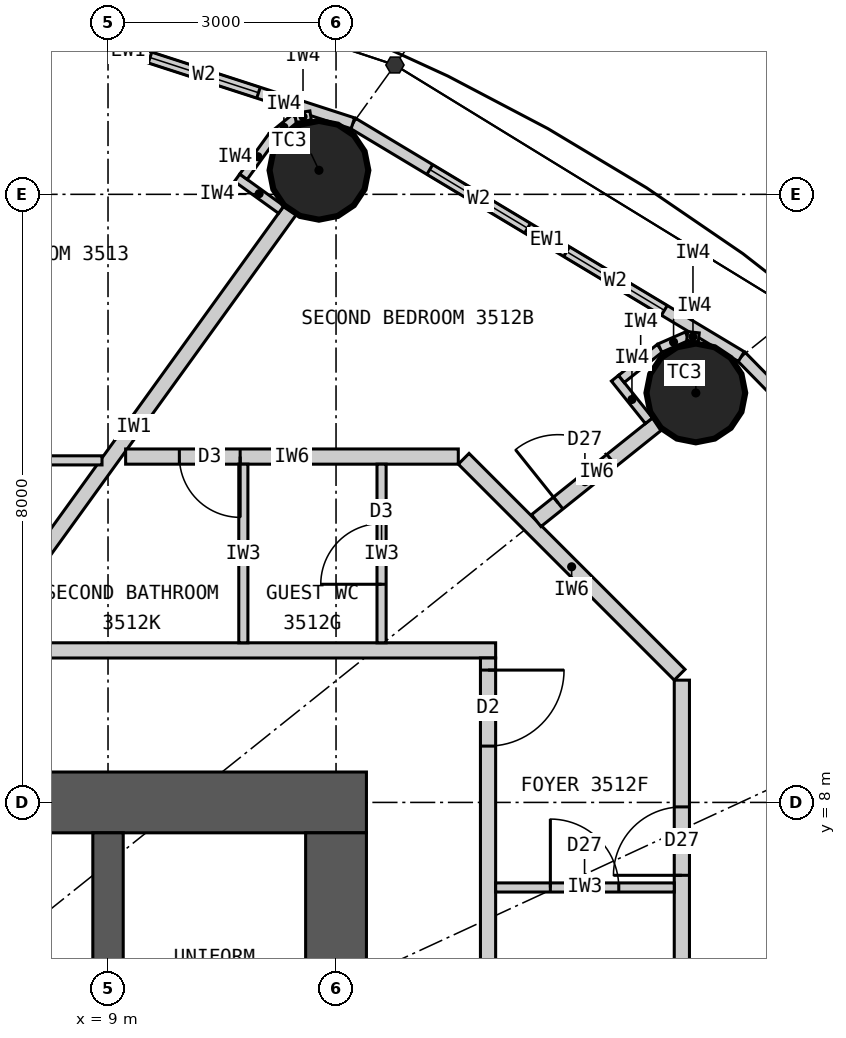
"""IFC4 building model, lengths in metres.
Left out: names, types, materials, properties, quantities, classifications, styles, units other than length and angle.
Written with IfcOpenShell. Run it as: python <this file> out.ifc"""

import sys

from ifc_helpers import new_model, si_unit, direction, frame, frame_2d, origin, origin_2d, place, context, subcontext, project, spatial, rectangle, circle, extrude, clip, halfspace, element, fill, save


model = new_model("IFC4")
c1 = context("Model", 3, precision=1e-05, world=origin(), true_north=direction((0.0, 1.0)))
c2 = subcontext(c1, "Body", "Model", "MODEL_VIEW")
j1 = project(units=[si_unit("LENGTHUNIT", "METRE"), si_unit("PLANEANGLEUNIT", "RADIAN")], contexts=[c1])
p1 = place(None, origin())
s1 = spatial("IfcSite", under=j1, at=p1, CompositionType="ELEMENT")
p2 = place(p1, origin())
s2 = spatial("IfcBuilding", under=s1, at=p2, CompositionType="ELEMENT")
p3 = place(p2, frame((0.0, 0.0, 135.3)))
s3 = spatial("IfcBuildingStorey", under=s2, at=p3, CompositionType="ELEMENT", Elevation=135.3)
for number, where, z_axis, x_axis in (
    (1, (16.734, 13.387, 0.0), (0.0, 0.0, 1.0), (1.0, 0.0, 0.0)),
    (2, (11.775, 16.316, 0.0), (0.0, 0.0, 1.0), (1.0, 0.0, 0.0)),
):
    element("IfcColumn", number, at=place(p3, frame(where, z_axis=z_axis, x_axis=x_axis)), inside=s3, PredefinedType="COLUMN", context=c2, shape_type="Clipping", body=[
        clip(extrude(circle(Radius=0.65, at=origin_2d()), origin(), (0.0, 0.0, 1.0), 3.3), halfspace(frame((0.0, 0.0, 2.25), z_axis=(0.0, 0.0, 1.0), x_axis=(1.0, 0.0, 0.0)), False)),
    ])
p4 = place(p3, frame((-12.4, 8.0, 0.0), z_axis=(0.0, 0.0, 1.0), x_axis=(1.0, 0.0, 0.0)))
e3 = element("IfcWall", 3, at=p4, inside=s3, PredefinedType="SHEAR", context=c2, shape_type="SweptSolid", body=[
    extrude(rectangle(XDim=24.8, YDim=0.8, at=frame_2d((12.4, 0.0))), origin(), (0.0, 0.0, 1.0), 3.3),
])
p5 = place(p4, frame((11.1, 0.0, 0.0)))
e4 = element("IfcOpeningElement", 4, at=p5, cuts=e3, PredefinedType="OPENING", context=c2, shape_type="SweptSolid", body=[
    extrude(rectangle(XDim=1.2, YDim=2.2, at=frame_2d((0.6, 1.1))), frame((0.0, 0.41, 0.0), z_axis=(0.0, -1.0, 0.0), x_axis=(1.0, 0.0, 0.0)), (0.0, 0.0, 1.0), 0.82),
])
p6 = place(p4, frame((18.7, 0.0, 0.0)))
e5 = element("IfcOpeningElement", 5, at=p6, cuts=e3, PredefinedType="OPENING", context=c2, shape_type="SweptSolid", body=[
    extrude(rectangle(XDim=0.9, YDim=2.2, at=frame_2d((0.45, 1.1))), frame((0.0, 0.41, 0.0), z_axis=(0.0, -1.0, 0.0), x_axis=(1.0, 0.0, 0.0)), (0.0, 0.0, 1.0), 0.82),
])
p7 = place(p3, frame((12.0, -7.6, 0.0), z_axis=(0.0, 0.0, 1.0), x_axis=(0.0, 1.0, 0.0)))
e6 = element("IfcWall", 6, at=p7, inside=s3, PredefinedType="SHEAR", context=c2, shape_type="SweptSolid", body=[
    extrude(rectangle(XDim=15.2, YDim=0.8, at=frame_2d((7.6, 0.0))), origin(), (0.0, 0.0, 1.0), 3.3),
])
p8 = place(p7, frame((6.7, 0.0, 0.0)))
e7 = element("IfcOpeningElement", 7, at=p8, cuts=e6, PredefinedType="OPENING", context=c2, shape_type="SweptSolid", body=[
    extrude(rectangle(XDim=1.8, YDim=2.2, at=frame_2d((0.9, 1.1))), frame((0.0, 0.41, 0.0), z_axis=(0.0, -1.0, 0.0), x_axis=(1.0, 0.0, 0.0)), (0.0, 0.0, 1.0), 0.82),
])
p9 = place(p3, frame((9.0, 4.5, 0.0), z_axis=(0.0, 0.0, 1.0), x_axis=(0.0, 1.0, 0.0)))
e8 = element("IfcWall", 8, at=p9, inside=s3, PredefinedType="SHEAR", context=c2, shape_type="SweptSolid", body=[
    extrude(rectangle(XDim=3.1, YDim=0.4, at=frame_2d((1.55, 0.0))), origin(), (0.0, 0.0, 1.0), 3.3),
])
p10 = place(p3, frame((21.287, 9.832, 0.0), z_axis=(0.0, 0.0, 1.0), x_axis=(-0.700136650834, 0.714008872605, 0.0)))
e9 = element("IfcWall", 9, at=p10, inside=s3, PredefinedType="ELEMENTEDWALL", context=c2, shape_type="SweptSolid", body=[
    extrude(rectangle(XDim=5.649, YDim=0.15, at=frame_2d((2.825, 0.0))), origin(), (0.0, 0.0, 1.0), 3.05),
])
p11 = place(p10, frame((1.025, 0.0, 0.9)))
e10 = element("IfcOpeningElement", 10, at=p11, cuts=e9, PredefinedType="OPENING", context=c2, shape_type="SweptSolid", body=[
    extrude(rectangle(XDim=1.5, YDim=1.9, at=frame_2d((0.75, 0.95))), frame((0.0, 0.085, 0.0), z_axis=(0.0, -1.0, 0.0), x_axis=(1.0, 0.0, 0.0)), (0.0, 0.0, 1.0), 0.17),
])
p12 = place(p10, frame((3.125, 0.0, 0.9)))
e11 = element("IfcOpeningElement", 11, at=p12, cuts=e9, PredefinedType="OPENING", context=c2, shape_type="SweptSolid", body=[
    extrude(rectangle(XDim=1.5, YDim=1.9, at=frame_2d((0.75, 0.95))), frame((0.0, 0.085, 0.0), z_axis=(0.0, -1.0, 0.0), x_axis=(1.0, 0.0, 0.0)), (0.0, 0.0, 1.0), 0.17),
])
p13 = place(p3, frame((17.332, 13.866, 0.0), z_axis=(0.0, 0.0, 1.0), x_axis=(-0.857308573723, 0.514802884044, 0.0)))
e12 = element("IfcWall", 12, at=p13, inside=s3, PredefinedType="ELEMENTEDWALL", context=c2, shape_type="SweptSolid", body=[
    extrude(rectangle(XDim=5.961, YDim=0.15, at=frame_2d((2.98, 0.0))), origin(), (0.0, 0.0, 1.0), 3.05),
])
p14 = place(p13, frame((1.181, 0.0, 0.9)))
e13 = element("IfcOpeningElement", 13, at=p14, cuts=e12, PredefinedType="OPENING", context=c2, shape_type="SweptSolid", body=[
    extrude(rectangle(XDim=1.5, YDim=1.9, at=frame_2d((0.75, 0.95))), frame((0.0, 0.085, 0.0), z_axis=(0.0, -1.0, 0.0), x_axis=(1.0, 0.0, 0.0)), (0.0, 0.0, 1.0), 0.17),
])
p15 = place(p13, frame((3.281, 0.0, 0.9)))
e14 = element("IfcOpeningElement", 14, at=p15, cuts=e12, PredefinedType="OPENING", context=c2, shape_type="SweptSolid", body=[
    extrude(rectangle(XDim=1.5, YDim=1.9, at=frame_2d((0.75, 0.95))), frame((0.0, 0.085, 0.0), z_axis=(0.0, -1.0, 0.0), x_axis=(1.0, 0.0, 0.0)), (0.0, 0.0, 1.0), 0.17),
])
p16 = place(p3, frame((12.221, 16.935, 0.0), z_axis=(0.0, 0.0, 1.0), x_axis=(-0.951272691506, 0.308350881944, 0.0)))
e15 = element("IfcWall", 15, at=p16, inside=s3, PredefinedType="ELEMENTEDWALL", context=c2, shape_type="SweptSolid", body=[
    extrude(rectangle(XDim=6.211, YDim=0.15, at=frame_2d((3.105, 0.0))), origin(), (0.0, 0.0, 1.0), 3.05),
])
p17 = place(p16, frame((1.305, 0.0, 0.9)))
e16 = element("IfcOpeningElement", 16, at=p17, cuts=e15, PredefinedType="OPENING", context=c2, shape_type="SweptSolid", body=[
    extrude(rectangle(XDim=1.5, YDim=1.9, at=frame_2d((0.75, 0.95))), frame((0.0, 0.085, 0.0), z_axis=(0.0, -1.0, 0.0), x_axis=(1.0, 0.0, 0.0)), (0.0, 0.0, 1.0), 0.17),
])
p18 = place(p16, frame((3.405, 0.0, 0.9)))
e17 = element("IfcOpeningElement", 17, at=p18, cuts=e15, PredefinedType="OPENING", context=c2, shape_type="SweptSolid", body=[
    extrude(rectangle(XDim=1.5, YDim=1.9, at=frame_2d((0.75, 0.95))), frame((0.0, 0.085, 0.0), z_axis=(0.0, -1.0, 0.0), x_axis=(1.0, 0.0, 0.0)), (0.0, 0.0, 1.0), 0.17),
])
p19 = place(p3, frame((-14.1, 10.0, 0.0), z_axis=(0.0, 0.0, 1.0), x_axis=(1.0, 0.0, 0.0)))
e18 = element("IfcWall", 18, at=p19, inside=s3, PredefinedType="PARTITIONING", context=c2, shape_type="SweptSolid", body=[
    extrude(rectangle(XDim=28.2, YDim=0.2, at=frame_2d((14.1, 0.0))), origin(), (0.0, 0.0, 1.0), 3.05),
])
p20 = place(p19, frame((12.884, 0.0, 0.0)))
e19 = element("IfcOpeningElement", 19, at=p20, cuts=e18, PredefinedType="OPENING", context=c2, shape_type="SweptSolid", body=[
    extrude(rectangle(XDim=1.0, YDim=2.2, at=frame_2d((0.5, 1.1))), frame((0.0, 0.11, 0.0), z_axis=(0.0, -1.0, 0.0), x_axis=(1.0, 0.0, 0.0)), (0.0, 0.0, 1.0), 0.22),
])
p21 = place(p19, frame((8.164, 0.0, 0.0)))
e20 = element("IfcOpeningElement", 20, at=p21, cuts=e18, PredefinedType="OPENING", context=c2, shape_type="SweptSolid", body=[
    extrude(rectangle(XDim=1.0, YDim=2.1, at=frame_2d((0.5, 1.05))), frame((0.0, 0.11, 0.0), z_axis=(0.0, -1.0, 0.0), x_axis=(1.0, 0.0, 0.0)), (0.0, 0.0, 1.0), 0.22),
])
p22 = place(p19, frame((3.591, 0.0, 0.0)))
e21 = element("IfcOpeningElement", 21, at=p22, cuts=e18, PredefinedType="OPENING", context=c2, shape_type="SweptSolid", body=[
    extrude(rectangle(XDim=1.0, YDim=2.2, at=frame_2d((0.5, 1.1))), frame((0.0, 0.11, 0.0), z_axis=(0.0, -1.0, 0.0), x_axis=(1.0, 0.0, 0.0)), (0.0, 0.0, 1.0), 0.22),
])
p23 = place(p19, frame((17.12, 0.0, 0.0)))
e22 = element("IfcOpeningElement", 22, at=p23, cuts=e18, PredefinedType="OPENING", context=c2, shape_type="SweptSolid", body=[
    extrude(rectangle(XDim=1.0, YDim=2.1, at=frame_2d((0.5, 1.05))), frame((0.0, 0.11, 0.0), z_axis=(0.0, -1.0, 0.0), x_axis=(1.0, 0.0, 0.0)), (0.0, 0.0, 1.0), 0.22),
])
p24 = place(p3, frame((14.0, -9.9, 0.0), z_axis=(0.0, 0.0, 1.0), x_axis=(0.0, 1.0, 0.0)))
e23 = element("IfcWall", 23, at=p24, inside=s3, PredefinedType="PARTITIONING", context=c2, shape_type="SweptSolid", body=[
    extrude(rectangle(XDim=19.8, YDim=0.2, at=frame_2d((9.9, 0.0))), origin(), (0.0, 0.0, 1.0), 3.05),
])
p25 = place(p24, frame((4.948, 0.0, 0.0)))
e24 = element("IfcOpeningElement", 24, at=p25, cuts=e23, PredefinedType="OPENING", context=c2, shape_type="SweptSolid", body=[
    extrude(rectangle(XDim=1.0, YDim=2.2, at=frame_2d((0.5, 1.1))), frame((0.0, 0.11, 0.0), z_axis=(0.0, -1.0, 0.0), x_axis=(1.0, 0.0, 0.0)), (0.0, 0.0, 1.0), 0.22),
])
p26 = place(p24, frame((18.641, 0.0, 0.0)))
e25 = element("IfcOpeningElement", 25, at=p26, cuts=e23, PredefinedType="OPENING", context=c2, shape_type="SweptSolid", body=[
    extrude(rectangle(XDim=1.0, YDim=2.2, at=frame_2d((0.5, 1.1))), frame((0.0, 0.11, 0.0), z_axis=(0.0, -1.0, 0.0), x_axis=(1.0, 0.0, 0.0)), (0.0, 0.0, 1.0), 0.22),
])
p27 = place(p3, frame((7.289, 10.1, 0.0), z_axis=(0.0, 0.0, 1.0), x_axis=(0.585217367024, 0.81087645997, 0.0)))
e26 = element("IfcWall", 26, at=p27, inside=s3, PredefinedType="PARTITIONING", context=c2, shape_type="SweptSolid", body=[
    extrude(rectangle(XDim=7.016, YDim=0.2, at=frame_2d((3.508, 0.0))), origin(), (0.0, 0.0, 1.0), 2.15),
])
p28 = place(p3, frame((16.55, 0.101, 0.0), z_axis=(0.0, 0.0, 1.0), x_axis=(0.0, 1.0, 0.0)))
e27 = element("IfcWall", 27, at=p28, inside=s3, PredefinedType="PARTITIONING", context=c2, shape_type="SweptSolid", body=[
    extrude(rectangle(XDim=9.508, YDim=0.2, at=frame_2d((4.754, 0.0))), origin(), (0.0, 0.0, 1.0), 3.05),
])
p29 = place(p28, frame((2.499, 0.0, 0.0)))
e28 = element("IfcOpeningElement", 28, at=p29, cuts=e27, PredefinedType="OPENING", context=c2, shape_type="SweptSolid", body=[
    extrude(rectangle(XDim=0.8, YDim=2.1, at=frame_2d((0.4, 1.05))), frame((0.0, 0.11, 0.0), z_axis=(0.0, -1.0, 0.0), x_axis=(1.0, 0.0, 0.0)), (0.0, 0.0, 1.0), 0.22),
])
p30 = place(p28, frame((6.94, 0.0, 0.0)))
e29 = element("IfcOpeningElement", 29, at=p30, cuts=e27, PredefinedType="OPENING", context=c2, shape_type="SweptSolid", body=[
    extrude(rectangle(XDim=0.9, YDim=2.1, at=frame_2d((0.45, 1.05))), frame((0.0, 0.11, 0.0), z_axis=(0.0, -1.0, 0.0), x_axis=(1.0, 0.0, 0.0)), (0.0, 0.0, 1.0), 0.22),
])
p31 = place(p3, frame((16.521, 9.679, 0.0), z_axis=(0.0, 0.0, 1.0), x_axis=(-0.707106781187, 0.707106781187, 0.0)))
e30 = element("IfcWall", 30, at=p31, inside=s3, PredefinedType="PARTITIONING", context=c2, shape_type="SweptSolid", body=[
    extrude(rectangle(XDim=4.019, YDim=0.2, at=frame_2d((2.009, 0.0))), origin(), (0.0, 0.0, 1.0), 3.05),
])
p32 = place(p3, frame((13.609, 12.55, 0.0), z_axis=(0.0, 0.0, 1.0), x_axis=(-1.0, 0.0, 0.0)))
e31 = element("IfcWall", 31, at=p32, inside=s3, PredefinedType="PARTITIONING", context=c2, shape_type="SweptSolid", body=[
    extrude(rectangle(XDim=4.377, YDim=0.2, at=frame_2d((2.188, 0.0))), origin(), (0.0, 0.0, 1.0), 3.05),
])
p33 = place(p32, frame((2.87, 0.0, 0.0)))
e32 = element("IfcOpeningElement", 32, at=p33, cuts=e31, PredefinedType="OPENING", context=c2, shape_type="SweptSolid", body=[
    extrude(rectangle(XDim=0.8, YDim=2.1, at=frame_2d((0.4, 1.05))), frame((0.0, 0.11, 0.0), z_axis=(0.0, -1.0, 0.0), x_axis=(1.0, 0.0, 0.0)), (0.0, 0.0, 1.0), 0.22),
])
p34 = place(p3, frame((14.634, 11.707, 0.0), z_axis=(0.0, 0.0, 1.0), x_axis=(0.780845447951, 0.6247242483, 0.0)))
e33 = element("IfcWall", 33, at=p34, inside=s3, PredefinedType="PARTITIONING", context=c2, shape_type="SweptSolid", body=[
    extrude(rectangle(XDim=2.039, YDim=0.2, at=frame_2d((1.02, 0.0))), origin(), (0.0, 0.0, 1.0), 2.15),
])
p35 = place(p34, frame((0.37, 0.0, 0.0)))
e34 = element("IfcOpeningElement", 34, at=p35, cuts=e33, PredefinedType="OPENING", context=c2, shape_type="SweptSolid", body=[
    extrude(rectangle(XDim=0.9, YDim=2.1, at=frame_2d((0.45, 1.05))), frame((0.0, 0.11, 0.0), z_axis=(0.0, -1.0, 0.0), x_axis=(1.0, 0.0, 0.0)), (0.0, 0.0, 1.0), 0.22),
])
p36 = place(p3, frame((14.1, 6.881, 0.0), z_axis=(0.0, 0.0, 1.0), x_axis=(1.0, 0.0, 0.0)))
e35 = element("IfcWall", 35, at=p36, inside=s3, PredefinedType="PARTITIONING", context=c2, shape_type="SweptSolid", body=[
    extrude(rectangle(XDim=2.35, YDim=0.12, at=frame_2d((1.175, 0.0))), origin(), (0.0, 0.0, 1.0), 3.05),
])
p37 = place(p36, frame((0.72, 0.0, 0.0)))
e36 = element("IfcOpeningElement", 36, at=p37, cuts=e35, PredefinedType="OPENING", context=c2, shape_type="SweptSolid", body=[
    extrude(rectangle(XDim=0.9, YDim=2.1, at=frame_2d((0.45, 1.05))), frame((0.0, 0.07, 0.0), z_axis=(0.0, -1.0, 0.0), x_axis=(1.0, 0.0, 0.0)), (0.0, 0.0, 1.0), 0.14),
])
p38 = place(p3, frame((12.599, 10.1, 0.0), z_axis=(0.0, 0.0, 1.0), x_axis=(0.0, 1.0, 0.0)))
e37 = element("IfcWall", 37, at=p38, inside=s3, PredefinedType="PARTITIONING", context=c2, shape_type="SweptSolid", body=[
    extrude(rectangle(XDim=2.35, YDim=0.12, at=frame_2d((1.175, 0.0))), origin(), (0.0, 0.0, 1.0), 3.05),
])
p39 = place(p38, frame((0.77, 0.0, 0.0)))
e38 = element("IfcOpeningElement", 38, at=p39, cuts=e37, PredefinedType="OPENING", context=c2, shape_type="SweptSolid", body=[
    extrude(rectangle(XDim=0.8, YDim=2.1, at=frame_2d((0.4, 1.05))), frame((0.0, 0.07, 0.0), z_axis=(0.0, -1.0, 0.0), x_axis=(1.0, 0.0, 0.0)), (0.0, 0.0, 1.0), 0.14),
])
p40 = place(p3, frame((10.781, 10.1, 0.0), z_axis=(0.0, 0.0, 1.0), x_axis=(0.0, 1.0, 0.0)))
e39 = element("IfcWall", 39, at=p40, inside=s3, PredefinedType="PARTITIONING", context=c2, shape_type="SweptSolid", body=[
    extrude(rectangle(XDim=2.35, YDim=0.12, at=frame_2d((1.175, 0.0))), origin(), (0.0, 0.0, 1.0), 3.05),
])
p41 = place(p3, frame((8.921, 12.5, 0.0), z_axis=(0.0, 0.0, 1.0), x_axis=(-1.0, 0.0, 0.0)))
e40 = element("IfcWall", 40, at=p41, inside=s3, PredefinedType="PARTITIONING", context=c2, shape_type="SweptSolid", body=[
    extrude(rectangle(XDim=3.672, YDim=0.12, at=frame_2d((1.836, 0.0))), origin(), (0.0, 0.0, 1.0), 3.05),
])
p42 = place(p41, frame((1.436, 0.0, 0.0)))
e41 = element("IfcOpeningElement", 41, at=p42, cuts=e40, PredefinedType="OPENING", context=c2, shape_type="SweptSolid", body=[
    extrude(rectangle(XDim=0.8, YDim=2.1, at=frame_2d((0.4, 1.05))), frame((0.0, 0.07, 0.0), z_axis=(0.0, -1.0, 0.0), x_axis=(1.0, 0.0, 0.0)), (0.0, 0.0, 1.0), 0.14),
])
p43 = place(p3, frame((16.117, 13.022, 0.0), z_axis=(0.0, 0.0, 1.0), x_axis=(-0.62465344249, 0.780902091677, 0.0)))
e42 = element("IfcWall", 42, at=p43, inside=s3, PredefinedType="PARTITIONING", context=c2, shape_type="SweptSolid", body=[
    extrude(rectangle(XDim=0.716, YDim=0.12, at=frame_2d((0.358, 0.0))), origin(), (0.0, 0.0, 1.0), 3.05),
])
p44 = place(p3, frame((15.754, 13.571, 0.0), z_axis=(0.0, 0.0, 1.0), x_axis=(0.780905453553, 0.624649239663, 0.0)))
e43 = element("IfcWall", 43, at=p44, inside=s3, PredefinedType="PARTITIONING", context=c2, shape_type="SweptSolid", body=[
    extrude(rectangle(XDim=0.65, YDim=0.12, at=frame_2d((0.325, 0.0))), origin(), (0.0, 0.0, 1.0), 3.05),
])
p45 = place(p3, frame((16.262, 13.977, 0.0), z_axis=(0.0, 0.0, 1.0), x_axis=(0.915985403703, 0.401211590314, 0.0)))
e44 = element("IfcWall", 44, at=p45, inside=s3, PredefinedType="PARTITIONING", context=c2, shape_type="SweptSolid", body=[
    extrude(rectangle(XDim=0.391, YDim=0.12, at=frame_2d((0.196, 0.0))), origin(), (0.0, 0.0, 1.0), 3.05),
])
p46 = place(p3, frame((16.62, 14.134, 0.0), z_axis=(0.0, 0.0, 1.0), x_axis=(0.993941871493, -0.109907033867, 0.0)))
e45 = element("IfcWall", 45, at=p46, inside=s3, PredefinedType="PARTITIONING", context=c2, shape_type="SweptSolid", body=[
    extrude(rectangle(XDim=0.153, YDim=0.12, at=frame_2d((0.077, 0.0))), origin(), (0.0, 0.0, 1.0), 3.05),
])
p47 = place(p3, frame((11.279, 15.799, 0.0), z_axis=(0.0, 0.0, 1.0), x_axis=(-0.810912957127, 0.585166793285, 0.0)))
e46 = element("IfcWall", 46, at=p47, inside=s3, PredefinedType="PARTITIONING", context=c2, shape_type="SweptSolid", body=[
    extrude(rectangle(XDim=0.716, YDim=0.12, at=frame_2d((0.358, 0.0))), origin(), (0.0, 0.0, 1.0), 3.05),
])
p48 = place(p3, frame((10.782, 16.231, 0.0), z_axis=(0.0, 0.0, 1.0), x_axis=(0.585175102182, 0.810906961239, 0.0)))
e47 = element("IfcWall", 47, at=p48, inside=s3, PredefinedType="PARTITIONING", context=c2, shape_type="SweptSolid", body=[
    extrude(rectangle(XDim=0.65, YDim=0.12, at=frame_2d((0.325, 0.0))), origin(), (0.0, 0.0, 1.0), 3.05),
])
p49 = place(p3, frame((11.162, 16.759, 0.0), z_axis=(0.0, 0.0, 1.0), x_axis=(0.775178428527, 0.63174235567, 0.0)))
e48 = element("IfcWall", 48, at=p49, inside=s3, PredefinedType="PARTITIONING", context=c2, shape_type="SweptSolid", body=[
    extrude(rectangle(XDim=0.392, YDim=0.12, at=frame_2d((0.196, 0.0))), origin(), (0.0, 0.0, 1.0), 3.05),
])
p50 = place(p3, frame((11.466, 17.006, 0.0), z_axis=(0.0, 0.0, 1.0), x_axis=(0.987228877621, 0.15930832744, 0.0)))
e49 = element("IfcWall", 49, at=p50, inside=s3, PredefinedType="PARTITIONING", context=c2, shape_type="SweptSolid", body=[
    extrude(rectangle(XDim=0.202, YDim=0.12, at=frame_2d((0.101, 0.0))), origin(), (0.0, 0.0, 1.0), 3.05),
])
p51 = place(p14, origin())
e50 = element("IfcWindow", 50, at=p51, inside=s3, PartitioningType="SINGLE_PANEL", PredefinedType="WINDOW", context=c2, shape_type="SweptSolid", body=[
    extrude(rectangle(XDim=1.5, YDim=1.9, at=frame_2d((0.75, 0.95))), frame((0.0, 0.03, 0.0), z_axis=(0.0, -1.0, 0.0), x_axis=(1.0, 0.0, 0.0)), (0.0, 0.0, 1.0), 0.06),
])
fill(e13, e50)
p52 = place(p15, origin())
e51 = element("IfcWindow", 51, at=p52, inside=s3, PartitioningType="SINGLE_PANEL", PredefinedType="WINDOW", context=c2, shape_type="SweptSolid", body=[
    extrude(rectangle(XDim=1.5, YDim=1.9, at=frame_2d((0.75, 0.95))), frame((0.0, 0.03, 0.0), z_axis=(0.0, -1.0, 0.0), x_axis=(1.0, 0.0, 0.0)), (0.0, 0.0, 1.0), 0.06),
])
fill(e14, e51)
p53 = place(p17, origin())
e52 = element("IfcWindow", 52, at=p53, inside=s3, PartitioningType="SINGLE_PANEL", PredefinedType="WINDOW", context=c2, shape_type="SweptSolid", body=[
    extrude(rectangle(XDim=1.5, YDim=1.9, at=frame_2d((0.75, 0.95))), frame((0.0, 0.03, 0.0), z_axis=(0.0, -1.0, 0.0), x_axis=(1.0, 0.0, 0.0)), (0.0, 0.0, 1.0), 0.06),
])
fill(e16, e52)
p54 = place(p26, origin())
e53 = element("IfcDoor", 53, at=p54, inside=s3, OperationType="SINGLE_SWING_RIGHT", PredefinedType="DOOR", context=c2, shape_type="SweptSolid", body=[
    extrude(rectangle(XDim=1.0, YDim=2.2, at=frame_2d((0.5, 1.1))), frame((0.0, 0.025, 0.0), z_axis=(0.0, -1.0, 0.0), x_axis=(1.0, 0.0, 0.0)), (0.0, 0.0, 1.0), 0.05),
])
fill(e25, e53)
p55 = place(p37, origin())
e54 = element("IfcDoor", 54, at=p55, inside=s3, OperationType="SINGLE_SWING_LEFT", PredefinedType="DOOR", context=c2, shape_type="SweptSolid", body=[
    extrude(rectangle(XDim=0.9, YDim=2.1, at=frame_2d((0.45, 1.05))), frame((0.0, 0.025, 0.0), z_axis=(0.0, -1.0, 0.0), x_axis=(1.0, 0.0, 0.0)), (0.0, 0.0, 1.0), 0.05),
])
fill(e36, e54)
p56 = place(p39, origin())
e55 = element("IfcDoor", 55, at=p56, inside=s3, OperationType="SINGLE_SWING_LEFT", PredefinedType="DOOR", context=c2, shape_type="SweptSolid", body=[
    extrude(rectangle(XDim=0.8, YDim=2.1, at=frame_2d((0.4, 1.05))), frame((0.0, 0.025, 0.0), z_axis=(0.0, -1.0, 0.0), x_axis=(1.0, 0.0, 0.0)), (0.0, 0.0, 1.0), 0.05),
])
fill(e38, e55)
p57 = place(p33, origin())
e56 = element("IfcDoor", 56, at=p57, inside=s3, OperationType="SINGLE_SWING_LEFT", PredefinedType="DOOR", context=c2, shape_type="SweptSolid", body=[
    extrude(rectangle(XDim=0.8, YDim=2.1, at=frame_2d((0.4, 1.05))), frame((0.0, 0.025, 0.0), z_axis=(0.0, -1.0, 0.0), x_axis=(1.0, 0.0, 0.0)), (0.0, 0.0, 1.0), 0.05),
])
fill(e32, e56)
p58 = place(p30, origin())
e57 = element("IfcDoor", 57, at=p58, inside=s3, OperationType="SINGLE_SWING_LEFT", PredefinedType="DOOR", context=c2, shape_type="SweptSolid", body=[
    extrude(rectangle(XDim=0.9, YDim=2.1, at=frame_2d((0.45, 1.05))), frame((0.0, 0.025, 0.0), z_axis=(0.0, -1.0, 0.0), x_axis=(1.0, 0.0, 0.0)), (0.0, 0.0, 1.0), 0.05),
])
fill(e29, e57)
p59 = place(p35, origin())
e58 = element("IfcDoor", 58, at=p59, inside=s3, OperationType="SINGLE_SWING_LEFT", PredefinedType="DOOR", context=c2, shape_type="SweptSolid", body=[
    extrude(rectangle(XDim=0.9, YDim=2.1, at=frame_2d((0.45, 1.05))), frame((0.0, 0.025, 0.0), z_axis=(0.0, -1.0, 0.0), x_axis=(1.0, 0.0, 0.0)), (0.0, 0.0, 1.0), 0.05),
])
fill(e34, e58)
save(model, sys.argv[1])
